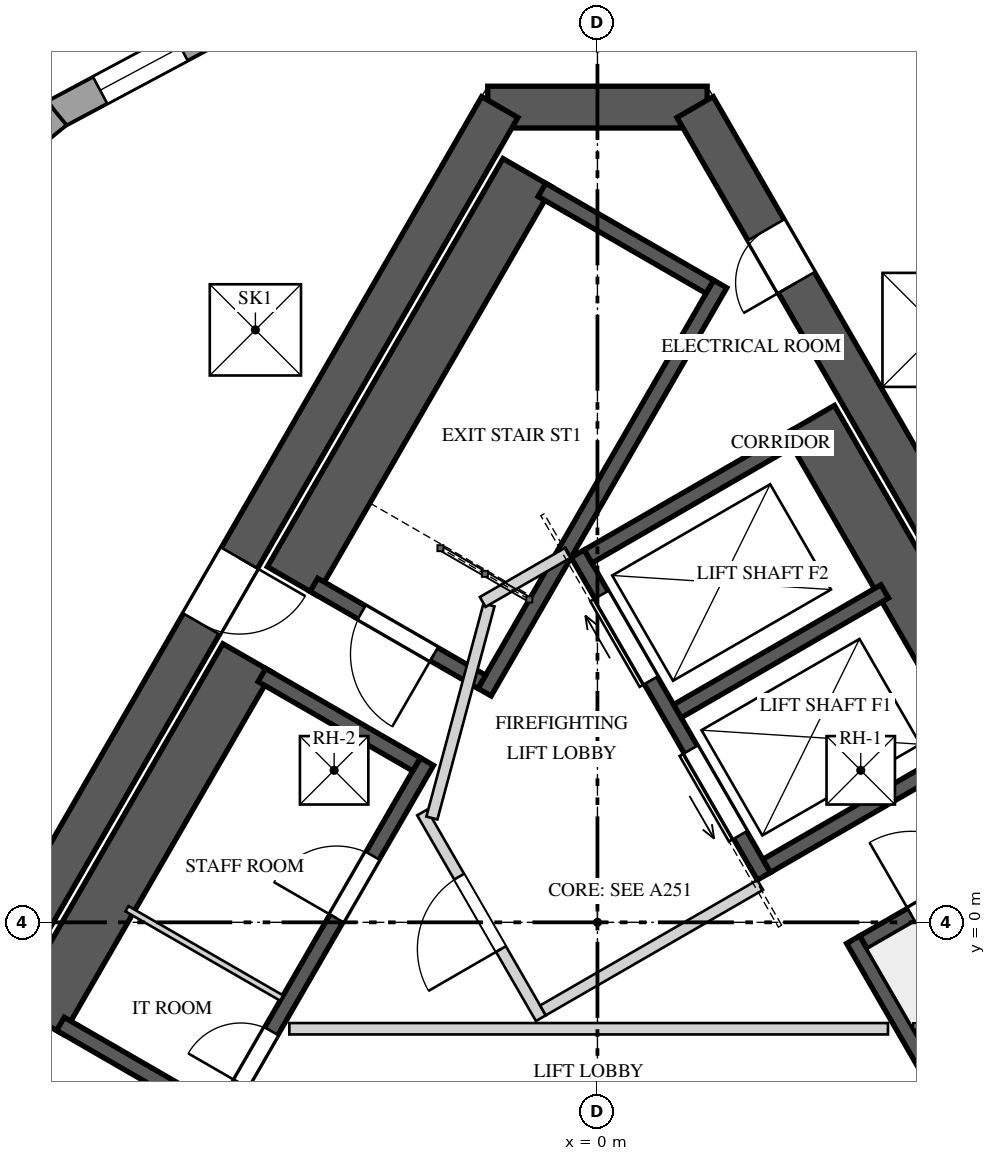
"""IFC4 building model, lengths in metres.
Left out: names, types, materials, properties, quantities, classifications, styles, units other than length and angle.
Written with IfcOpenShell. Run it as: python <this file> out.ifc"""

import sys

from ifc_helpers import new_model, si_unit, direction, frame, frame_2d, origin, origin_2d, place, context, subcontext, project, spatial, rectangle, extrude, element, fill, save


model = new_model("IFC4")
c1 = context("Model", 3, precision=1e-05, world=origin(), true_north=direction((0.0, 1.0)))
c2 = subcontext(c1, "Body", "Model", "MODEL_VIEW")
j1 = project(units=[si_unit("LENGTHUNIT", "METRE"), si_unit("PLANEANGLEUNIT", "RADIAN")], contexts=[c1])
p1 = place(None, origin())
s1 = spatial("IfcSite", under=j1, at=p1, CompositionType="ELEMENT")
p2 = place(p1, origin())
s2 = spatial("IfcBuilding", under=s1, at=p2, CompositionType="ELEMENT")
p3 = place(p2, frame((0.0, 0.0, 380.9)))
s3 = spatial("IfcBuildingStorey", under=s2, at=p3, CompositionType="ELEMENT", Elevation=380.9)
p4 = place(p3, frame((1.443, 10.725, 0.0), z_axis=(0.0, 0.0, 1.0), x_axis=(-1.0, 0.0, 0.0)))
e1 = element("IfcWall", 1, at=p4, inside=s3, PredefinedType="SHEAR", context=c2, shape_type="SweptSolid", body=[
    extrude(rectangle(XDim=2.887, YDim=0.55, at=frame_2d((1.443, 0.0))), origin(), (0.0, 0.0, 1.0), 11.65),
])
p5 = place(p3, frame((-1.285, 10.725, 0.0), z_axis=(0.0, 0.0, 1.0), x_axis=(-0.499994590896, -0.86602852671, 0.0)))
e2 = element("IfcWall", 2, at=p5, inside=s3, PredefinedType="SHEAR", context=c2, shape_type="SweptSolid", body=[
    extrude(rectangle(XDim=17.292, YDim=0.55, at=frame_2d((8.646, 0.0))), origin(), (0.0, 0.0, 1.0), 11.65),
])
p6 = place(p5, frame((6.851, 0.0, 0.0)))
e3 = element("IfcOpeningElement", 3, at=p6, cuts=e2, PredefinedType="OPENING", context=c2, shape_type="SweptSolid", body=[
    extrude(rectangle(XDim=1.0, YDim=2.4, at=frame_2d((0.5, 1.2))), frame((0.0, 0.285, 0.0), z_axis=(0.0, -1.0, 0.0), x_axis=(1.0, 0.0, 0.0)), (0.0, 0.0, 1.0), 0.57),
])
p7 = place(p3, frame((9.93, -4.25, 0.0), z_axis=(0.0, 0.0, 1.0), x_axis=(-0.499994590896, 0.86602852671, 0.0)))
e4 = element("IfcWall", 4, at=p7, inside=s3, PredefinedType="SHEAR", context=c2, shape_type="SweptSolid", body=[
    extrude(rectangle(XDim=17.292, YDim=0.55, at=frame_2d((8.646, 0.0))), origin(), (0.0, 0.0, 1.0), 11.65),
])
p8 = place(p7, frame((6.921, 0.0, 0.0)))
e5 = element("IfcOpeningElement", 5, at=p8, cuts=e4, PredefinedType="OPENING", context=c2, shape_type="SweptSolid", body=[
    extrude(rectangle(XDim=1.0, YDim=2.4, at=frame_2d((0.5, 1.2))), frame((0.0, 0.285, 0.0), z_axis=(0.0, -1.0, 0.0), x_axis=(1.0, 0.0, 0.0)), (0.0, 0.0, 1.0), 0.57),
])
p9 = place(p7, frame((14.626, 0.0, 0.0)))
e6 = element("IfcOpeningElement", 6, at=p9, cuts=e4, PredefinedType="OPENING", context=c2, shape_type="SweptSolid", body=[
    extrude(rectangle(XDim=0.8, YDim=2.1, at=frame_2d((0.4, 1.05))), frame((0.0, 0.285, 0.0), z_axis=(0.0, -1.0, 0.0), x_axis=(1.0, 0.0, 0.0)), (0.0, 0.0, 1.0), 0.57),
])
p10 = place(p3, frame((-4.898, 11.826, 0.0), z_axis=(0.0, 0.0, 1.0), x_axis=(-0.881911600521, -0.47141481613, 0.0)))
e7 = element("IfcWall", 7, at=p10, inside=s3, PredefinedType="SOLIDWALL", context=c2, shape_type="SweptSolid", body=[
    extrude(rectangle(XDim=2.529, YDim=0.4, at=frame_2d((1.264, 0.0))), origin(), (0.0, 0.0, 1.0), 11.65),
])
p11 = place(p10, frame((0.665, 0.0, 1.5)))
e8 = element("IfcOpeningElement", 8, at=p11, cuts=e7, PredefinedType="OPENING", context=c2, shape_type="SweptSolid", body=[
    extrude(rectangle(XDim=1.2, YDim=8.0, at=frame_2d((0.6, 4.0))), frame((0.0, 0.21, 0.0), z_axis=(0.0, -1.0, 0.0), x_axis=(1.0, 0.0, 0.0)), (0.0, 0.0, 1.0), 0.42),
])
p12 = place(p3, frame((-7.111, 10.643, 0.0), z_axis=(0.0, 0.0, 1.0), x_axis=(-0.773018742182, -0.634383184074, 0.0)))
e9 = element("IfcWall", 9, at=p12, inside=s3, PredefinedType="SOLIDWALL", context=c2, shape_type="SweptSolid", body=[
    extrude(rectangle(XDim=2.529, YDim=0.4, at=frame_2d((1.264, 0.0))), origin(), (0.0, 0.0, 1.0), 11.65),
])
p13 = place(p3, frame((-24.801, 5.463, 0.0), z_axis=(0.0, 0.0, 1.0), x_axis=(0.669133322061, -0.74314238024, 0.0)))
e10 = element("IfcWall", 10, at=p13, inside=s3, PredefinedType="PARAPET", context=c2, shape_type="SweptSolid", body=[
    extrude(rectangle(XDim=41.439, YDim=0.45, at=frame_2d((20.72, 0.0))), origin(), (0.0, 0.0, 1.0), 1.2),
])
p14 = place(p3, frame((17.131, 18.747, 0.0), z_axis=(0.0, 0.0, 1.0), x_axis=(-0.978147499739, -0.207912165961, 0.0)))
e11 = element("IfcWall", 11, at=p14, inside=s3, PredefinedType="PARAPET", context=c2, shape_type="SweptSolid", body=[
    extrude(rectangle(XDim=41.439, YDim=0.45, at=frame_2d((20.72, 0.0))), origin(), (0.0, 0.0, 1.0), 1.2),
])
p15 = place(p3, frame((-0.918, 9.86, 0.0), z_axis=(0.0, 0.0, 1.0), x_axis=(-0.500026960575, -0.86600983753, 0.0)))
e12 = element("IfcWall", 12, at=p15, inside=s3, PredefinedType="SOLIDWALL", context=c2, shape_type="SweptSolid", body=[
    extrude(rectangle(XDim=6.2, YDim=0.75, at=frame_2d((3.1, 0.0))), origin(), (0.0, 0.0, 1.0), 11.65),
])
p16 = place(p3, frame((1.615, 8.397, 0.0), z_axis=(0.0, 0.0, 1.0), x_axis=(-0.500009909098, -0.866019682689, 0.0)))
e13 = element("IfcWall", 13, at=p16, inside=s3, PredefinedType="SOLIDWALL", context=c2, shape_type="SweptSolid", body=[
    extrude(rectangle(XDim=6.2, YDim=0.2, at=frame_2d((3.1, 0.0))), origin(), (0.0, 0.0, 1.0), 11.65),
])
p17 = place(p3, frame((1.479, 8.361, 0.0), z_axis=(0.0, 0.0, 1.0), x_axis=(-0.865989465428, 0.500062241894, 0.0)))
e14 = element("IfcWall", 14, at=p17, inside=s3, PredefinedType="SOLIDWALL", context=c2, shape_type="SweptSolid", body=[
    extrude(rectangle(XDim=2.55, YDim=0.2, at=frame_2d((1.275, 0.0))), origin(), (0.0, 0.0, 1.0), 11.65),
])
p18 = place(p3, frame((-1.521, 3.165, 0.0), z_axis=(0.0, 0.0, 1.0), x_axis=(-0.866030925526, 0.499990435942, 0.0)))
e15 = element("IfcWall", 15, at=p18, inside=s3, PredefinedType="SOLIDWALL", context=c2, shape_type="SweptSolid", body=[
    extrude(rectangle(XDim=2.55, YDim=0.2, at=frame_2d((1.275, 0.0))), origin(), (0.0, 0.0, 1.0), 11.65),
])
p19 = place(p18, frame((0.725, 0.0, 0.0)))
e16 = element("IfcOpeningElement", 16, at=p19, cuts=e15, PredefinedType="OPENING", context=c2, shape_type="SweptSolid", body=[
    extrude(rectangle(XDim=1.1, YDim=2.4, at=frame_2d((0.55, 1.2))), frame((0.0, 0.11, 0.0), z_axis=(0.0, -1.0, 0.0), x_axis=(1.0, 0.0, 0.0)), (0.0, 0.0, 1.0), 0.22),
])
p20 = place(p3, frame((6.465, -5.597, 0.0), z_axis=(0.0, 0.0, 1.0), x_axis=(-0.49998037582, 0.866036733513, 0.0)))
e17 = element("IfcWall", 17, at=p20, inside=s3, PredefinedType="SOLIDWALL", context=c2, shape_type="SweptSolid", body=[
    extrude(rectangle(XDim=6.2, YDim=0.2, at=frame_2d((3.1, 0.0))), origin(), (0.0, 0.0, 1.0), 11.65),
])
p21 = place(p3, frame((3.501, -0.265, 0.0), z_axis=(0.0, 0.0, 1.0), x_axis=(0.866030925526, 0.499990435942, 0.0)))
e18 = element("IfcWall", 18, at=p21, inside=s3, PredefinedType="SOLIDWALL", context=c2, shape_type="SweptSolid", body=[
    extrude(rectangle(XDim=2.55, YDim=0.2, at=frame_2d((1.275, 0.0))), origin(), (0.0, 0.0, 1.0), 11.65),
])
p22 = place(p21, frame((0.725, 0.0, 0.0)))
e19 = element("IfcOpeningElement", 19, at=p22, cuts=e18, PredefinedType="OPENING", context=c2, shape_type="SweptSolid", body=[
    extrude(rectangle(XDim=1.1, YDim=2.4, at=frame_2d((0.55, 1.2))), frame((0.0, 0.11, 0.0), z_axis=(0.0, -1.0, 0.0), x_axis=(1.0, 0.0, 0.0)), (0.0, 0.0, 1.0), 0.22),
])
p23 = place(p3, frame((-4.993, -2.648, 0.0), z_axis=(0.0, 0.0, 1.0), x_axis=(0.499996545922, 0.866027397988, 0.0)))
e20 = element("IfcWall", 20, at=p23, inside=s3, PredefinedType="SOLIDWALL", context=c2, shape_type="SweptSolid", body=[
    extrude(rectangle(XDim=5.5, YDim=0.2, at=frame_2d((2.75, 0.0))), origin(), (0.0, 0.0, 1.0), 11.65),
])
p24 = place(p23, frame((3.12, 0.0, 0.0)))
e21 = element("IfcOpeningElement", 21, at=p24, cuts=e20, PredefinedType="OPENING", context=c2, shape_type="SweptSolid", body=[
    extrude(rectangle(XDim=0.95, YDim=2.4, at=frame_2d((0.475, 1.2))), frame((0.0, 0.11, 0.0), z_axis=(0.0, -1.0, 0.0), x_axis=(1.0, 0.0, 0.0)), (0.0, 0.0, 1.0), 0.22),
])
p25 = place(p23, frame((0.605, 0.0, 0.0)))
e22 = element("IfcOpeningElement", 22, at=p25, cuts=e20, PredefinedType="OPENING", context=c2, shape_type="SweptSolid", body=[
    extrude(rectangle(XDim=0.8, YDim=2.1, at=frame_2d((0.4, 1.05))), frame((0.0, 0.11, 0.0), z_axis=(0.0, -1.0, 0.0), x_axis=(1.0, 0.0, 0.0)), (0.0, 0.0, 1.0), 0.22),
])
p26 = place(p3, frame((-4.603, 3.477, 0.0), z_axis=(0.0, 0.0, 1.0), x_axis=(-0.500015767406, -0.866016300277, 0.0)))
e23 = element("IfcWall", 23, at=p26, inside=s3, PredefinedType="SOLIDWALL", context=c2, shape_type="SweptSolid", body=[
    extrude(rectangle(XDim=5.5, YDim=0.75, at=frame_2d((2.75, 0.0))), origin(), (0.0, 0.0, 1.0), 11.65),
])
p27 = place(p3, frame((-2.38, 2.078, 0.0), z_axis=(0.0, 0.0, 1.0), x_axis=(-0.866061024631, 0.499938297808, 0.0)))
e24 = element("IfcWall", 24, at=p27, inside=s3, PredefinedType="SOLIDWALL", context=c2, shape_type="SweptSolid", body=[
    extrude(rectangle(XDim=2.35, YDim=0.2, at=frame_2d((1.175, 0.0))), origin(), (0.0, 0.0, 1.0), 11.65),
])
p28 = place(p3, frame((-5.03, -2.512, 0.0), z_axis=(0.0, 0.0, 1.0), x_axis=(-0.866016039709, 0.500016218704, 0.0)))
e25 = element("IfcWall", 25, at=p28, inside=s3, PredefinedType="SOLIDWALL", context=c2, shape_type="SweptSolid", body=[
    extrude(rectangle(XDim=2.35, YDim=0.2, at=frame_2d((1.175, 0.0))), origin(), (0.0, 0.0, 1.0), 11.65),
])
p29 = place(p3, frame((-4.155, -0.996, 0.0), z_axis=(0.0, 0.0, 1.0), x_axis=(-0.866016039709, 0.500016218704, 0.0)))
e26 = element("IfcWall", 26, at=p29, inside=s3, PredefinedType="PARTITIONING", context=c2, shape_type="SweptSolid", body=[
    extrude(rectangle(XDim=2.35, YDim=0.08, at=frame_2d((1.175, 0.0))), origin(), (0.0, 0.0, 1.0), 11.65),
])
p30 = place(p3, frame((2.19, 0.606, 0.0), z_axis=(0.0, 0.0, 1.0), x_axis=(-0.500002801628, 0.866023786258, 0.0)))
e27 = element("IfcWall", 27, at=p30, inside=s3, PredefinedType="SOLIDWALL", context=c2, shape_type="SweptSolid", body=[
    extrude(rectangle(XDim=4.9, YDim=0.2, at=frame_2d((2.45, 0.0))), origin(), (0.0, 0.0, 1.0), 11.65),
])
p31 = place(p30, frame((0.625, 0.0, 0.0)))
e28 = element("IfcOpeningElement", 28, at=p31, cuts=e27, PredefinedType="OPENING", context=c2, shape_type="SweptSolid", body=[
    extrude(rectangle(XDim=1.3, YDim=2.1, at=frame_2d((0.65, 1.05))), frame((0.0, 0.11, 0.0), z_axis=(0.0, -1.0, 0.0), x_axis=(1.0, 0.0, 0.0)), (0.0, 0.0, 1.0), 0.22),
])
p32 = place(p30, frame((2.975, 0.0, 0.0)))
e29 = element("IfcOpeningElement", 29, at=p32, cuts=e27, PredefinedType="OPENING", context=c2, shape_type="SweptSolid", body=[
    extrude(rectangle(XDim=1.3, YDim=2.1, at=frame_2d((0.65, 1.05))), frame((0.0, 0.11, 0.0), z_axis=(0.0, -1.0, 0.0), x_axis=(1.0, 0.0, 0.0)), (0.0, 0.0, 1.0), 0.22),
])
p33 = place(p3, frame((5.243, 2.369, 0.0), z_axis=(0.0, 0.0, 1.0), x_axis=(-0.500002801628, 0.866023786258, 0.0)))
e30 = element("IfcWall", 30, at=p33, inside=s3, PredefinedType="SOLIDWALL", context=c2, shape_type="SweptSolid", body=[
    extrude(rectangle(XDim=4.9, YDim=0.75, at=frame_2d((2.45, 0.0))), origin(), (0.0, 0.0, 1.0), 11.65),
])
for number, where, z_axis, x_axis in (
    (31, (2.227, 0.743, 0.0), (0.0, 0.0, 1.0), (0.866, 0.5, 0.0)),
    (32, (1.052, 2.778, 0.0), (0.0, 0.0, 1.0), (0.866, 0.5, 0.0)),
    (33, (-0.123, 4.813, 0.0), (0.0, 0.0, 1.0), (0.866, 0.5, 0.0)),
):
    element("IfcWall", number, at=place(p3, frame(where, z_axis=z_axis, x_axis=x_axis)), inside=s3, PredefinedType="SOLIDWALL", context=c2, shape_type="SweptSolid", body=[
        extrude(rectangle(XDim=3.15, YDim=0.2, at=frame_2d((1.575, 0.0))), origin(), (0.0, 0.0, 1.0), 11.65),
    ])
p34 = place(p3, frame((-0.744, -1.261, 0.0), z_axis=(0.0, 0.0, 1.0), x_axis=(-0.500004234368, 0.866022959057, 0.0)))
e34 = element("IfcWall", 34, at=p34, inside=s3, PredefinedType="PARTITIONING", context=c2, shape_type="SweptSolid", body=[
    extrude(rectangle(XDim=3.125, YDim=0.15, at=frame_2d((1.562, 0.0))), origin(), (0.0, 0.0, 1.0), 11.65),
])
p35 = place(p34, frame((1.05, 0.0, 0.0)))
e35 = element("IfcOpeningElement", 35, at=p35, cuts=e34, PredefinedType="OPENING", context=c2, shape_type="SweptSolid", body=[
    extrude(rectangle(XDim=1.1, YDim=2.4, at=frame_2d((0.55, 1.2))), frame((0.0, 0.085, 0.0), z_axis=(0.0, -1.0, 0.0), x_axis=(1.0, 0.0, 0.0)), (0.0, 0.0, 1.0), 0.17),
])
p36 = place(p3, frame((-0.717, -1.159, 0.0), z_axis=(0.0, 0.0, 1.0), x_axis=(0.866008176907, 0.50002983664, 0.0)))
e36 = element("IfcWall", 36, at=p36, inside=s3, PredefinedType="PARTITIONING", context=c2, shape_type="SweptSolid", body=[
    extrude(rectangle(XDim=3.3, YDim=0.15, at=frame_2d((1.65, 0.0))), origin(), (0.0, 0.0, 1.0), 11.65),
])
p37 = place(p3, frame((-2.178, 1.372, 0.0), z_axis=(0.0, 0.0, 1.0), x_axis=(0.258808958833, 0.96592852884, 0.0)))
e37 = element("IfcWall", 37, at=p37, inside=s3, PredefinedType="PARTITIONING", context=c2, shape_type="SweptSolid", body=[
    extrude(rectangle(XDim=2.903, YDim=0.15, at=frame_2d((1.451, 0.0))), origin(), (0.0, 0.0, 1.0), 11.65),
])
p38 = place(p3, frame((-1.51, 4.215, 0.0), z_axis=(0.0, 0.0, 1.0), x_axis=(0.866085525409, 0.49989585183, 0.0)))
e38 = element("IfcWall", 38, at=p38, inside=s3, PredefinedType="PARTITIONING", context=c2, shape_type="SweptSolid", body=[
    extrude(rectangle(XDim=1.3, YDim=0.15, at=frame_2d((0.65, 0.0))), origin(), (0.0, 0.0, 1.0), 11.65),
])
p39 = place(p3, frame((-4.053, -1.4, 0.0), z_axis=(0.0, 0.0, 1.0), x_axis=(1.0, 0.0, 0.0)))
e39 = element("IfcWall", 39, at=p39, inside=s3, PredefinedType="PARTITIONING", context=c2, shape_type="SweptSolid", body=[
    extrude(rectangle(XDim=7.876, YDim=0.15, at=frame_2d((3.938, 0.0))), origin(), (0.0, 0.0, 1.0), 11.65),
])
p40 = place(p11, origin())
e40 = element("IfcWindow", 40, at=p40, inside=s3, PartitioningType="SINGLE_PANEL", PredefinedType="WINDOW", context=c2, shape_type="SweptSolid", body=[
    extrude(rectangle(XDim=1.2, YDim=8.0, at=frame_2d((0.6, 4.0))), frame((0.0, 0.03, 0.0), z_axis=(0.0, -1.0, 0.0), x_axis=(1.0, 0.0, 0.0)), (0.0, 0.0, 1.0), 0.06),
])
fill(e8, e40)
p41 = place(p2, frame((0.0, 0.0, 392.9)))
p42 = place(p41, frame((3.126, 0.385, 0.0), z_axis=(0.0, 0.0, 1.0), x_axis=(0.866030925526, 0.499990435942, 0.0)))
p43 = place(p42, frame((0.675, 0.0, 0.0)))
p44 = place(p43, origin())
e41 = element("IfcDoor", 41, at=p44, inside=s3, OperationType="DOUBLE_DOOR_SINGLE_SWING", PredefinedType="DOOR", context=c2, shape_type="SweptSolid", body=[
    extrude(rectangle(XDim=1.2, YDim=2.1, at=frame_2d((0.6, 1.05))), frame((0.0, 0.025, 0.0), z_axis=(0.0, -1.0, 0.0), x_axis=(1.0, 0.0, 0.0)), (0.0, 0.0, 1.0), 0.05),
])
p45 = place(p41, frame((0.0, 0.0, -0.35)))
p46 = place(p45, frame((4.5, 7.794, 0.0)))
p47 = place(p46, frame((0.0, 0.0, 0.3)))
e42 = element("IfcWindow", 42, at=p47, inside=s3, PartitioningType="SINGLE_PANEL", PredefinedType="SKYLIGHT", context=c2, shape_type="SweptSolid", body=[
    extrude(rectangle(XDim=1.5, YDim=1.5, at=origin_2d()), origin(), (0.0, 0.0, 1.0), 0.05),
])
p48 = place(p45, frame((-4.5, 7.794, 0.0)))
p49 = place(p48, frame((0.0, 0.0, 0.3)))
e43 = element("IfcWindow", 43, at=p49, inside=s3, PartitioningType="SINGLE_PANEL", PredefinedType="SKYLIGHT", context=c2, shape_type="SweptSolid", body=[
    extrude(rectangle(XDim=1.2, YDim=1.2, at=origin_2d()), origin(), (0.0, 0.0, 1.0), 0.05),
])
p50 = place(p45, frame((3.464, 2.0, 0.0)))
p51 = place(p50, frame((0.0, 0.0, 0.35)))
e44 = element("IfcDoor", 44, at=p51, inside=s3, OperationType="SINGLE_SWING_LEFT", PredefinedType="TRAPDOOR", context=c2, shape_type="SweptSolid", body=[
    extrude(rectangle(XDim=0.9, YDim=0.9, at=origin_2d()), origin(), (0.0, 0.0, 1.0), 0.05),
])
p52 = place(p45, frame((-3.464, 2.0, 0.0)))
p53 = place(p52, frame((0.0, 0.0, 0.35)))
e45 = element("IfcDoor", 45, at=p53, inside=s3, OperationType="SINGLE_SWING_LEFT", PredefinedType="TRAPDOOR", context=c2, shape_type="SweptSolid", body=[
    extrude(rectangle(XDim=0.9, YDim=0.9, at=origin_2d()), origin(), (0.0, 0.0, 1.0), 0.05),
])
p54 = place(p19, origin())
e46 = element("IfcDoor", 46, at=p54, inside=s3, OperationType="SINGLE_SWING_RIGHT", PredefinedType="DOOR", context=c2, shape_type="SweptSolid", body=[
    extrude(rectangle(XDim=1.1, YDim=2.4, at=frame_2d((0.55, 1.2))), frame((0.0, 0.025, 0.0), z_axis=(0.0, -1.0, 0.0), x_axis=(1.0, 0.0, 0.0)), (0.0, 0.0, 1.0), 0.05),
])
fill(e16, e46)
p55 = place(p22, origin())
e47 = element("IfcDoor", 47, at=p55, inside=s3, OperationType="SINGLE_SWING_RIGHT", PredefinedType="DOOR", context=c2, shape_type="SweptSolid", body=[
    extrude(rectangle(XDim=1.1, YDim=2.4, at=frame_2d((0.55, 1.2))), frame((0.0, 0.025, 0.0), z_axis=(0.0, -1.0, 0.0), x_axis=(1.0, 0.0, 0.0)), (0.0, 0.0, 1.0), 0.05),
])
fill(e19, e47)
p56 = place(p24, origin())
e48 = element("IfcDoor", 48, at=p56, inside=s3, OperationType="SINGLE_SWING_LEFT", PredefinedType="DOOR", context=c2, shape_type="SweptSolid", body=[
    extrude(rectangle(XDim=0.95, YDim=2.4, at=frame_2d((0.475, 1.2))), frame((0.0, 0.025, 0.0), z_axis=(0.0, -1.0, 0.0), x_axis=(1.0, 0.0, 0.0)), (0.0, 0.0, 1.0), 0.05),
])
fill(e21, e48)
p57 = place(p25, origin())
e49 = element("IfcDoor", 49, at=p57, inside=s3, OperationType="SINGLE_SWING_RIGHT", PredefinedType="DOOR", context=c2, shape_type="SweptSolid", body=[
    extrude(rectangle(XDim=0.8, YDim=2.1, at=frame_2d((0.4, 1.05))), frame((0.0, 0.025, 0.0), z_axis=(0.0, -1.0, 0.0), x_axis=(1.0, 0.0, 0.0)), (0.0, 0.0, 1.0), 0.05),
])
fill(e22, e49)
p58 = place(p31, origin())
e50 = element("IfcDoor", 50, at=p58, inside=s3, OperationType="SLIDING_TO_LEFT", PredefinedType="DOOR", context=c2, shape_type="SweptSolid", body=[
    extrude(rectangle(XDim=1.3, YDim=2.1, at=frame_2d((0.65, 1.05))), frame((0.0, 0.025, 0.0), z_axis=(0.0, -1.0, 0.0), x_axis=(1.0, 0.0, 0.0)), (0.0, 0.0, 1.0), 0.05),
])
fill(e28, e50)
p59 = place(p32, origin())
e51 = element("IfcDoor", 51, at=p59, inside=s3, OperationType="SLIDING_TO_RIGHT", PredefinedType="DOOR", context=c2, shape_type="SweptSolid", body=[
    extrude(rectangle(XDim=1.3, YDim=2.1, at=frame_2d((0.65, 1.05))), frame((0.0, 0.025, 0.0), z_axis=(0.0, -1.0, 0.0), x_axis=(1.0, 0.0, 0.0)), (0.0, 0.0, 1.0), 0.05),
])
fill(e29, e51)
p60 = place(p35, origin())
e52 = element("IfcDoor", 52, at=p60, inside=s3, OperationType="SINGLE_SWING_LEFT", PredefinedType="DOOR", context=c2, shape_type="SweptSolid", body=[
    extrude(rectangle(XDim=1.1, YDim=2.4, at=frame_2d((0.55, 1.2))), frame((0.0, 0.025, 0.0), z_axis=(0.0, -1.0, 0.0), x_axis=(1.0, 0.0, 0.0)), (0.0, 0.0, 1.0), 0.05),
])
fill(e35, e52)
p61 = place(p6, origin())
e53 = element("IfcDoor", 53, at=p61, inside=s3, OperationType="SINGLE_SWING_RIGHT", PredefinedType="DOOR", context=c2, shape_type="SweptSolid", body=[
    extrude(rectangle(XDim=1.0, YDim=2.4, at=frame_2d((0.5, 1.2))), frame((0.0, 0.025, 0.0), z_axis=(0.0, -1.0, 0.0), x_axis=(1.0, 0.0, 0.0)), (0.0, 0.0, 1.0), 0.05),
])
fill(e3, e53)
p62 = place(p9, origin())
e54 = element("IfcDoor", 54, at=p62, inside=s3, OperationType="SINGLE_SWING_RIGHT", PredefinedType="DOOR", context=c2, shape_type="SweptSolid", body=[
    extrude(rectangle(XDim=0.8, YDim=2.1, at=frame_2d((0.4, 1.05))), frame((0.0, 0.025, 0.0), z_axis=(0.0, -1.0, 0.0), x_axis=(1.0, 0.0, 0.0)), (0.0, 0.0, 1.0), 0.05),
])
fill(e6, e54)
save(model, sys.argv[1])
